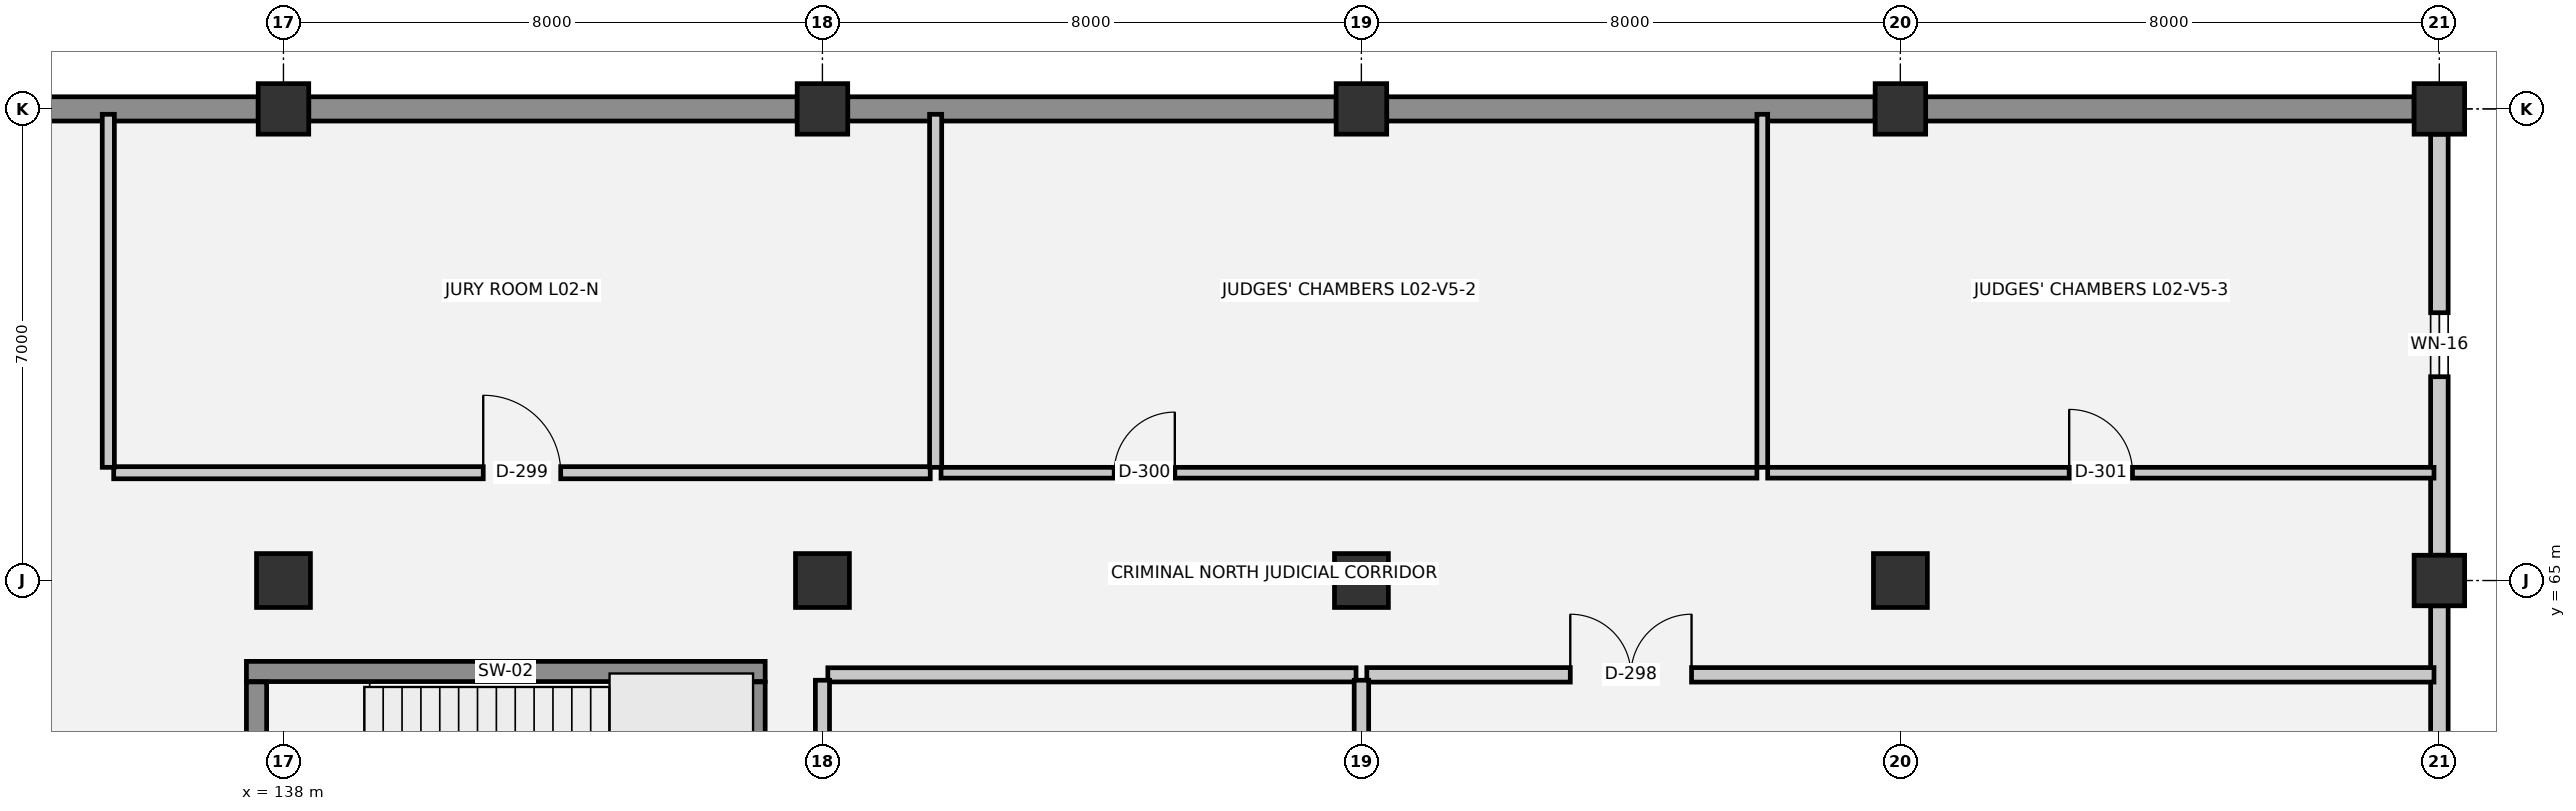
"""IFC4 building model, lengths in metres.
Left out: names, types, materials, properties, quantities, classifications, styles, units other than length and angle.
Written with IfcOpenShell. Run it as: python <this file> out.ifc"""

import sys

from ifc_helpers import new_model, si_unit, direction, frame, frame_2d, origin, origin_2d, place, context, subcontext, project, spatial, rectangle, extrude, element, fill, save


model = new_model("IFC4")
c1 = context("Model", 3, precision=1e-05, world=origin(), true_north=direction((0.0, 1.0)))
c2 = subcontext(c1, "Body", "Model", "MODEL_VIEW")
j1 = project(units=[si_unit("LENGTHUNIT", "METRE"), si_unit("PLANEANGLEUNIT", "RADIAN")], contexts=[c1])
p1 = place(None, origin())
s1 = spatial("IfcSite", under=j1, at=p1, CompositionType="ELEMENT")
p2 = place(p1, origin())
s2 = spatial("IfcBuilding", under=s1, at=p2, CompositionType="ELEMENT")
p3 = place(p2, frame((0.0, 0.0, 5.4)))
s3 = spatial("IfcBuildingStorey", under=s2, at=p3, CompositionType="ELEMENT", Elevation=5.4)
p4 = place(p3, frame((138.0, 65.0, 0.0), z_axis=(0.0, 0.0, 1.0), x_axis=(1.0, 0.0, 0.0)))
e1 = element("IfcColumn", 1, at=p4, inside=s3, PredefinedType="COLUMN", context=c2, shape_type="SweptSolid", body=[
    extrude(rectangle(XDim=0.8, YDim=0.8, at=origin_2d()), origin(), (0.0, 0.0, 1.0), 4.5),
])
p5 = place(p3, frame((138.0, 72.0, 0.0), z_axis=(0.0, 0.0, 1.0), x_axis=(1.0, 0.0, 0.0)))
e2 = element("IfcColumn", 2, at=p5, inside=s3, PredefinedType="COLUMN", context=c2, shape_type="SweptSolid", body=[
    extrude(rectangle(XDim=0.75, YDim=0.75, at=origin_2d()), origin(), (0.0, 0.0, 1.0), 4.5),
])
p6 = place(p3, frame((146.0, 65.0, 0.0), z_axis=(0.0, 0.0, 1.0), x_axis=(1.0, 0.0, 0.0)))
e3 = element("IfcColumn", 3, at=p6, inside=s3, PredefinedType="COLUMN", context=c2, shape_type="SweptSolid", body=[
    extrude(rectangle(XDim=0.8, YDim=0.8, at=origin_2d()), origin(), (0.0, 0.0, 1.0), 4.5),
])
p7 = place(p3, frame((146.0, 72.0, 0.0), z_axis=(0.0, 0.0, 1.0), x_axis=(1.0, 0.0, 0.0)))
e4 = element("IfcColumn", 4, at=p7, inside=s3, PredefinedType="COLUMN", context=c2, shape_type="SweptSolid", body=[
    extrude(rectangle(XDim=0.75, YDim=0.75, at=origin_2d()), origin(), (0.0, 0.0, 1.0), 4.5),
])
p8 = place(p3, frame((154.0, 65.0, 0.0), z_axis=(0.0, 0.0, 1.0), x_axis=(1.0, 0.0, 0.0)))
e5 = element("IfcColumn", 5, at=p8, inside=s3, PredefinedType="COLUMN", context=c2, shape_type="SweptSolid", body=[
    extrude(rectangle(XDim=0.8, YDim=0.8, at=origin_2d()), origin(), (0.0, 0.0, 1.0), 4.5),
])
p9 = place(p3, frame((154.0, 72.0, 0.0), z_axis=(0.0, 0.0, 1.0), x_axis=(1.0, 0.0, 0.0)))
e6 = element("IfcColumn", 6, at=p9, inside=s3, PredefinedType="COLUMN", context=c2, shape_type="SweptSolid", body=[
    extrude(rectangle(XDim=0.75, YDim=0.75, at=origin_2d()), origin(), (0.0, 0.0, 1.0), 4.5),
])
p10 = place(p3, frame((162.0, 65.0, 0.0), z_axis=(0.0, 0.0, 1.0), x_axis=(1.0, 0.0, 0.0)))
e7 = element("IfcColumn", 7, at=p10, inside=s3, PredefinedType="COLUMN", context=c2, shape_type="SweptSolid", body=[
    extrude(rectangle(XDim=0.8, YDim=0.8, at=origin_2d()), origin(), (0.0, 0.0, 1.0), 4.5),
])
for number, where, z_axis, x_axis in (
    (8, (162.0, 72.0, 0.0), (0.0, 0.0, 1.0), (1.0, 0.0, 0.0)),
    (9, (170.0, 65.0, 0.0), (0.0, 0.0, 1.0), (1.0, 0.0, 0.0)),
    (10, (170.0, 72.0, 0.0), (0.0, 0.0, 1.0), (1.0, 0.0, 0.0)),
):
    element("IfcColumn", number, at=place(p3, frame(where, z_axis=z_axis, x_axis=x_axis)), inside=s3, PredefinedType="COLUMN", context=c2, shape_type="SweptSolid", body=[
        extrude(rectangle(XDim=0.75, YDim=0.75, at=origin_2d()), origin(), (0.0, 0.0, 1.0), 4.5),
    ])
for number, where, z_axis, x_axis in (
    (11, (130.375, 72.0, 0.0), (0.0, 0.0, 1.0), (1.0, 0.0, 0.0)),
    (12, (138.375, 72.0, 0.0), (0.0, 0.0, 1.0), (1.0, 0.0, 0.0)),
    (13, (146.375, 72.0, 0.0), (0.0, 0.0, 1.0), (1.0, 0.0, 0.0)),
    (14, (154.375, 72.0, 0.0), (0.0, 0.0, 1.0), (1.0, 0.0, 0.0)),
    (15, (162.375, 72.0, 0.0), (0.0, 0.0, 1.0), (1.0, 0.0, 0.0)),
):
    element("IfcWall", number, at=place(p3, frame(where, z_axis=z_axis, x_axis=x_axis)), inside=s3, PredefinedType="SOLIDWALL", context=c2, shape_type="SweptSolid", body=[
        extrude(rectangle(XDim=7.25, YDim=0.36, at=frame_2d((3.625, 0.0))), origin(), (0.0, 0.0, 1.0), 4.2),
    ])
p11 = place(p3, frame((170.0, 71.625, 0.0), z_axis=(0.0, 0.0, 1.0), x_axis=(0.0, -1.0, 0.0)))
e16 = element("IfcWall", 16, at=p11, inside=s3, PredefinedType="SOLIDWALL", context=c2, shape_type="SweptSolid", body=[
    extrude(rectangle(XDim=6.25, YDim=0.26, at=frame_2d((3.125, 0.0))), origin(), (0.0, 0.0, 1.0), 3.23),
])
p12 = place(p11, frame((2.65, 0.0, 1.0)))
e17 = element("IfcOpeningElement", 17, at=p12, cuts=e16, PredefinedType="OPENING", context=c2, shape_type="SweptSolid", body=[
    extrude(rectangle(XDim=0.95, YDim=1.1, at=frame_2d((0.475, 0.55))), frame((0.0, 0.14, 0.0), z_axis=(0.0, -1.0, 0.0), x_axis=(1.0, 0.0, 0.0)), (0.0, 0.0, 1.0), 0.28),
])
p13 = place(p3, frame((170.0, 64.625, 0.0), z_axis=(0.0, 0.0, 1.0), x_axis=(0.0, -1.0, 0.0)))
e18 = element("IfcWall", 18, at=p13, inside=s3, PredefinedType="SOLIDWALL", context=c2, shape_type="SweptSolid", body=[
    extrude(rectangle(XDim=13.25, YDim=0.26, at=frame_2d((6.625, 0.0))), origin(), (0.0, 0.0, 1.0), 3.23),
])
p14 = place(p13, frame((6.15, 0.0, 1.0)))
e19 = element("IfcOpeningElement", 19, at=p14, cuts=e18, PredefinedType="OPENING", context=c2, shape_type="SweptSolid", body=[
    extrude(rectangle(XDim=0.95, YDim=1.1, at=frame_2d((0.475, 0.55))), frame((0.0, 0.14, 0.0), z_axis=(0.0, -1.0, 0.0), x_axis=(1.0, 0.0, 0.0)), (0.0, 0.0, 1.0), 0.28),
])
p15 = place(p3, frame((145.15, 63.65, 0.0), z_axis=(0.0, 0.0, 1.0), x_axis=(-1.0, 0.0, 0.0)))
e20 = element("IfcWall", 20, at=p15, inside=s3, PredefinedType="SHEAR", context=c2, shape_type="SweptSolid", body=[
    extrude(rectangle(XDim=7.7, YDim=0.3, at=frame_2d((3.85, 0.0))), origin(), (0.0, 0.0, 1.0), 4.2),
])
for number, where, z_axis, x_axis in (
    (21, (137.6, 63.495, 0.0), (0.0, 0.0, 1.0), (0.0, -1.0, 0.0)),
    (22, (145.0, 59.505, 0.0), (0.0, 0.0, 1.0), (0.0, 1.0, 0.0)),
):
    element("IfcWall", number, at=place(p3, frame(where, z_axis=z_axis, x_axis=x_axis)), inside=s3, PredefinedType="SHEAR", context=c2, shape_type="SweptSolid", body=[
        extrude(rectangle(XDim=3.99, YDim=0.3, at=frame_2d((1.995, 0.0))), origin(), (0.0, 0.0, 1.0), 4.2),
    ])
p16 = place(p3, frame((146.08, 63.6, 0.0), z_axis=(0.0, 0.0, 1.0), x_axis=(1.0, 0.0, 0.0)))
e23 = element("IfcWall", 23, at=p16, inside=s3, PredefinedType="PARTITIONING", context=c2, shape_type="SweptSolid", body=[
    extrude(rectangle(XDim=7.84, YDim=0.21, at=frame_2d((3.92, 0.0))), origin(), (0.0, 0.0, 1.0), 4.14),
])
p17 = place(p3, frame((154.08, 63.6, 0.0), z_axis=(0.0, 0.0, 1.0), x_axis=(1.0, 0.0, 0.0)))
e24 = element("IfcWall", 24, at=p17, inside=s3, PredefinedType="PARTITIONING", context=c2, shape_type="SweptSolid", body=[
    extrude(rectangle(XDim=15.84, YDim=0.215, at=frame_2d((7.92, 0.0))), origin(), (0.0, 0.0, 1.0), 4.14),
])
p18 = place(p17, frame((3.02, 0.0, 0.0)))
e25 = element("IfcOpeningElement", 25, at=p18, cuts=e24, PredefinedType="OPENING", context=c2, shape_type="SweptSolid", body=[
    extrude(rectangle(XDim=1.8, YDim=2.3, at=frame_2d((0.9, 1.15))), frame((0.0, 0.117, 0.0), z_axis=(0.0, -1.0, 0.0), x_axis=(1.0, 0.0, 0.0)), (0.0, 0.0, 1.0), 0.235),
])
p19 = place(p3, frame((135.48, 66.6, 0.0), z_axis=(0.0, 0.0, 1.0), x_axis=(1.0, 0.0, 0.0)))
e26 = element("IfcWall", 26, at=p19, inside=s3, PredefinedType="PARTITIONING", context=c2, shape_type="SweptSolid", body=[
    extrude(rectangle(XDim=12.12, YDim=0.18, at=frame_2d((6.06, 0.0))), origin(), (0.0, 0.0, 1.0), 4.14),
])
p20 = place(p19, frame((5.485, 0.0, 0.0)))
e27 = element("IfcOpeningElement", 27, at=p20, cuts=e26, PredefinedType="OPENING", context=c2, shape_type="SweptSolid", body=[
    extrude(rectangle(XDim=1.15, YDim=2.2, at=frame_2d((0.575, 1.1))), frame((0.0, 0.1, 0.0), z_axis=(0.0, -1.0, 0.0), x_axis=(1.0, 0.0, 0.0)), (0.0, 0.0, 1.0), 0.2),
])
p21 = place(p3, frame((147.76, 66.6, 0.0), z_axis=(0.0, 0.0, 1.0), x_axis=(1.0, 0.0, 0.0)))
e28 = element("IfcWall", 28, at=p21, inside=s3, PredefinedType="PARTITIONING", context=c2, shape_type="SweptSolid", body=[
    extrude(rectangle(XDim=12.11, YDim=0.16, at=frame_2d((6.055, 0.0))), origin(), (0.0, 0.0, 1.0), 4.14),
])
p22 = place(p21, frame((2.57, 0.0, 0.0)))
e29 = element("IfcOpeningElement", 29, at=p22, cuts=e28, PredefinedType="OPENING", context=c2, shape_type="SweptSolid", body=[
    extrude(rectangle(XDim=0.9, YDim=2.15, at=frame_2d((0.45, 1.075))), frame((0.0, 0.09, 0.0), z_axis=(0.0, -1.0, 0.0), x_axis=(1.0, 0.0, 0.0)), (0.0, 0.0, 1.0), 0.18),
])
p23 = place(p3, frame((160.03, 66.6, 0.0), z_axis=(0.0, 0.0, 1.0), x_axis=(1.0, 0.0, 0.0)))
e30 = element("IfcWall", 30, at=p23, inside=s3, PredefinedType="PARTITIONING", context=c2, shape_type="SweptSolid", body=[
    extrude(rectangle(XDim=9.89, YDim=0.16, at=frame_2d((4.945, 0.0))), origin(), (0.0, 0.0, 1.0), 4.14),
])
p24 = place(p23, frame((4.475, 0.0, 0.0)))
e31 = element("IfcOpeningElement", 31, at=p24, cuts=e30, PredefinedType="OPENING", context=c2, shape_type="SweptSolid", body=[
    extrude(rectangle(XDim=0.94, YDim=2.1, at=frame_2d((0.47, 1.05))), frame((0.0, 0.09, 0.0), z_axis=(0.0, -1.0, 0.0), x_axis=(1.0, 0.0, 0.0)), (0.0, 0.0, 1.0), 0.18),
])
p25 = place(p3, frame((135.4, 66.68, 0.0), z_axis=(0.0, 0.0, 1.0), x_axis=(0.0, 1.0, 0.0)))
e32 = element("IfcWall", 32, at=p25, inside=s3, PredefinedType="PARTITIONING", context=c2, shape_type="SweptSolid", body=[
    extrude(rectangle(XDim=5.24, YDim=0.18, at=frame_2d((2.62, 0.0))), origin(), (0.0, 0.0, 1.0), 4.14),
])
p26 = place(p3, frame((146.0, 51.35, 0.0), z_axis=(0.0, 0.0, 1.0), x_axis=(0.0, 1.0, 0.0)))
e33 = element("IfcWall", 33, at=p26, inside=s3, PredefinedType="PARTITIONING", context=c2, shape_type="SweptSolid", body=[
    extrude(rectangle(XDim=12.17, YDim=0.21, at=frame_2d((6.085, 0.0))), origin(), (0.0, 0.0, 1.0), 3.25),
])
p27 = place(p26, frame((4.91, 0.0, 0.0)))
e34 = element("IfcOpeningElement", 34, at=p27, cuts=e33, PredefinedType="OPENING", context=c2, shape_type="SweptSolid", body=[
    extrude(rectangle(XDim=2.35, YDim=2.4, at=frame_2d((1.175, 1.2))), frame((0.0, 0.115, 0.0), z_axis=(0.0, -1.0, 0.0), x_axis=(1.0, 0.0, 0.0)), (0.0, 0.0, 1.0), 0.23),
])
p28 = place(p3, frame((147.68, 66.68, 0.0), z_axis=(0.0, 0.0, 1.0), x_axis=(0.0, 1.0, 0.0)))
e35 = element("IfcWall", 35, at=p28, inside=s3, PredefinedType="PARTITIONING", context=c2, shape_type="SweptSolid", body=[
    extrude(rectangle(XDim=5.24, YDim=0.18, at=frame_2d((2.62, 0.0))), origin(), (0.0, 0.0, 1.0), 4.14),
])
p29 = place(p3, frame((154.0, 51.08, 0.0), z_axis=(0.0, 0.0, 1.0), x_axis=(0.0, 1.0, 0.0)))
e36 = element("IfcWall", 36, at=p29, inside=s3, PredefinedType="PARTITIONING", context=c2, shape_type="SweptSolid", body=[
    extrude(rectangle(XDim=12.44, YDim=0.215, at=frame_2d((6.22, 0.0))), origin(), (0.0, 0.0, 1.0), 3.25),
])
p30 = place(p3, frame((159.95, 66.68, 0.0), z_axis=(0.0, 0.0, 1.0), x_axis=(0.0, 1.0, 0.0)))
e37 = element("IfcWall", 37, at=p30, inside=s3, PredefinedType="PARTITIONING", context=c2, shape_type="SweptSolid", body=[
    extrude(rectangle(XDim=5.24, YDim=0.16, at=frame_2d((2.62, 0.0))), origin(), (0.0, 0.0, 1.0), 4.14),
])
p31 = place(p12, origin())
e38 = element("IfcWindow", 38, at=p31, inside=s3, PartitioningType="SINGLE_PANEL", PredefinedType="WINDOW", context=c2, shape_type="SweptSolid", body=[
    extrude(rectangle(XDim=0.95, YDim=1.1, at=frame_2d((0.475, 0.55))), frame((0.0, 0.03, 0.0), z_axis=(0.0, -1.0, 0.0), x_axis=(1.0, 0.0, 0.0)), (0.0, 0.0, 1.0), 0.06),
])
fill(e17, e38)
p32 = place(p18, origin())
e39 = element("IfcDoor", 39, at=p32, inside=s3, OperationType="DOUBLE_DOOR_SINGLE_SWING", PredefinedType="DOOR", context=c2, shape_type="SweptSolid", body=[
    extrude(rectangle(XDim=1.8, YDim=2.3, at=frame_2d((0.9, 1.15))), frame((0.0, 0.025, 0.0), z_axis=(0.0, -1.0, 0.0), x_axis=(1.0, 0.0, 0.0)), (0.0, 0.0, 1.0), 0.05),
])
fill(e25, e39)
p33 = place(p20, origin())
e40 = element("IfcDoor", 40, at=p33, inside=s3, OperationType="SINGLE_SWING_LEFT", PredefinedType="DOOR", context=c2, shape_type="SweptSolid", body=[
    extrude(rectangle(XDim=1.15, YDim=2.2, at=frame_2d((0.575, 1.1))), frame((0.0, 0.025, 0.0), z_axis=(0.0, -1.0, 0.0), x_axis=(1.0, 0.0, 0.0)), (0.0, 0.0, 1.0), 0.05),
])
fill(e27, e40)
p34 = place(p22, origin())
e41 = element("IfcDoor", 41, at=p34, inside=s3, OperationType="SINGLE_SWING_RIGHT", PredefinedType="DOOR", context=c2, shape_type="SweptSolid", body=[
    extrude(rectangle(XDim=0.9, YDim=2.15, at=frame_2d((0.45, 1.075))), frame((0.0, 0.025, 0.0), z_axis=(0.0, -1.0, 0.0), x_axis=(1.0, 0.0, 0.0)), (0.0, 0.0, 1.0), 0.05),
])
fill(e29, e41)
p35 = place(p24, origin())
e42 = element("IfcDoor", 42, at=p35, inside=s3, OperationType="SINGLE_SWING_LEFT", PredefinedType="DOOR", context=c2, shape_type="SweptSolid", body=[
    extrude(rectangle(XDim=0.94, YDim=2.1, at=frame_2d((0.47, 1.05))), frame((0.0, 0.025, 0.0), z_axis=(0.0, -1.0, 0.0), x_axis=(1.0, 0.0, 0.0)), (0.0, 0.0, 1.0), 0.05),
])
fill(e31, e42)
save(model, sys.argv[1])
